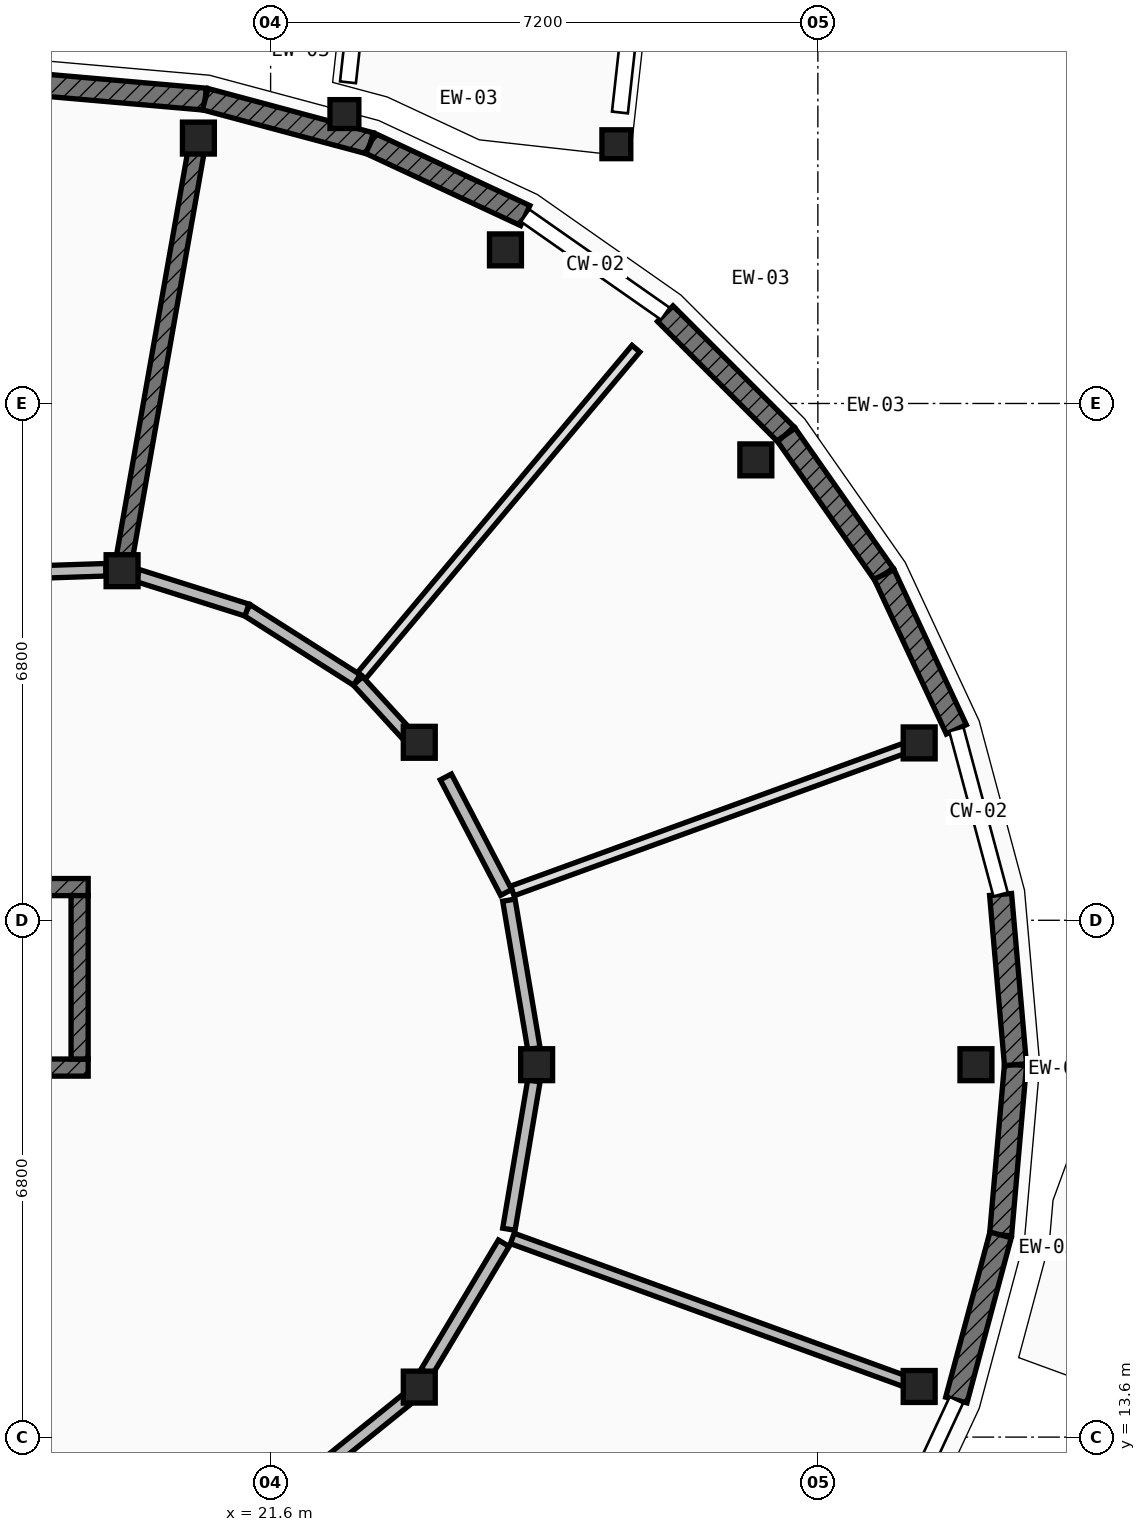
"""IFC4 building model, lengths in metres.
Left out: names, types, materials, properties, quantities, classifications, styles, units other than length and angle.
Written with IfcOpenShell. Run it as: python <this file> out.ifc"""

import sys

from ifc_helpers import new_model, si_unit, direction, frame, frame_2d, origin, origin_2d, place, context, subcontext, project, spatial, rectangle, circle, extrude, element, fill, save


model = new_model("IFC4")
c1 = context("Model", 3, precision=1e-05, world=origin(), true_north=direction((0.0, 1.0)))
c2 = subcontext(c1, "Body", "Model", "MODEL_VIEW")
j1 = project(units=[si_unit("LENGTHUNIT", "METRE"), si_unit("PLANEANGLEUNIT", "RADIAN")], contexts=[c1])
p1 = place(None, origin())
s1 = spatial("IfcSite", under=j1, at=p1, CompositionType="ELEMENT")
p2 = place(p1, origin())
s2 = spatial("IfcBuilding", under=s1, at=p2, CompositionType="ELEMENT")
p3 = place(p2, frame((0.0, 0.0, 4.55)))
s3 = spatial("IfcBuildingStorey", under=s2, at=p3, CompositionType="ELEMENT", Elevation=4.55)
for number, where, z_axis, x_axis in (
    (1, (30.88, 18.5, 0.0), (0.0, 0.0, 1.0), (1.0, 0.0, 0.0)),
    (2, (30.133, 22.734, 0.0), (0.0, 0.0, 1.0), (1.0, 0.0, 0.0)),
    (3, (27.984, 26.458, 0.0), (0.0, 0.0, 1.0), (1.0, 0.0, 0.0)),
    (4, (24.69, 29.221, 0.0), (0.0, 0.0, 1.0), (1.0, 0.0, 0.0)),
    (5, (20.65, 30.692, 0.0), (0.0, 0.0, 1.0), (1.0, 0.0, 0.0)),
    (6, (30.133, 14.266, 0.0), (0.0, 0.0, 1.0), (1.0, 0.0, 0.0)),
    (7, (25.1, 18.5, 0.0), (0.0, 0.0, 1.0), (1.0, 0.0, 0.0)),
    (8, (23.556, 22.742, 0.0), (0.0, 0.0, 1.0), (1.0, 0.0, 0.0)),
    (9, (19.646, 25.0, 0.0), (0.0, 0.0, 1.0), (1.0, 0.0, 0.0)),
    (10, (23.556, 14.258, 0.0), (0.0, 0.0, 1.0), (1.0, 0.0, 0.0)),
):
    element("IfcColumn", number, at=place(p3, frame(where, z_axis=z_axis, x_axis=x_axis)), inside=s3, PredefinedType="COLUMN", context=c2, shape_type="SweptSolid", body=[
        extrude(rectangle(XDim=0.42, YDim=0.42, at=origin_2d()), origin(), (0.0, 0.0, 1.0), 4.2),
    ])
for number, where, z_axis, x_axis in (
    (11, (22.571, 31.008, 0.0), (0.0, 0.0, 1.0), (1.0, 0.0, 0.0)),
    (12, (26.149, 30.611, 0.0), (0.0, 0.0, 1.0), (1.0, 0.0, 0.0)),
):
    element("IfcColumn", number, at=place(p3, frame(where, z_axis=z_axis, x_axis=x_axis)), inside=s3, PredefinedType="PILASTER", context=c2, shape_type="SweptSolid", body=[
        extrude(circle(Radius=0.19, at=origin_2d()), origin(), (0.0, 0.0, 1.0), 4.2),
    ])
p4 = place(p3, frame((31.4, 18.5, 0.0), z_axis=(0.0, 0.0, 1.0), x_axis=(-0.087079400775, -0.996201374201, 0.0)))
e13 = element("IfcWall", 13, at=p4, inside=s3, PredefinedType="ELEMENTEDWALL", context=c2, shape_type="SweptSolid", body=[
    extrude(rectangle(XDim=2.249, YDim=0.29, at=frame_2d((1.124, 0.0))), origin(), (0.0, 0.0, 1.0), 3.309),
])
p5 = place(p4, frame((0.574, 0.0, 0.85)))
e14 = element("IfcOpeningElement", 14, at=p5, cuts=e13, PredefinedType="OPENING", context=c2, shape_type="SweptSolid", body=[
    extrude(rectangle(XDim=1.1, YDim=1.5, at=frame_2d((0.55, 0.75))), frame((0.0, 0.155, 0.0), z_axis=(0.0, -1.0, 0.0), x_axis=(1.0, 0.0, 0.0)), (0.0, 0.0, 1.0), 0.31),
])
p6 = place(p3, frame((31.204, 16.26, 0.0), z_axis=(0.0, 0.0, 1.0), x_axis=(-0.258824721145, -0.96592430538, 0.0)))
e15 = element("IfcWall", 15, at=p6, inside=s3, PredefinedType="ELEMENTEDWALL", context=c2, shape_type="SweptSolid", body=[
    extrude(rectangle(XDim=2.249, YDim=0.29, at=frame_2d((1.125, 0.0))), origin(), (0.0, 0.0, 1.0), 3.309),
])
p7 = place(p6, frame((0.574, 0.0, 0.85)))
e16 = element("IfcOpeningElement", 16, at=p7, cuts=e15, PredefinedType="OPENING", context=c2, shape_type="SweptSolid", body=[
    extrude(rectangle(XDim=1.1, YDim=1.85, at=frame_2d((0.55, 0.925))), frame((0.0, 0.155, 0.0), z_axis=(0.0, -1.0, 0.0), x_axis=(1.0, 0.0, 0.0)), (0.0, 0.0, 1.0), 0.31),
])
p8 = place(p3, frame((18.5, 31.4, 0.0), z_axis=(0.0, 0.0, 1.0), x_axis=(0.996201374201, -0.087079400775, 0.0)))
e17 = element("IfcWall", 17, at=p8, inside=s3, PredefinedType="ELEMENTEDWALL", context=c2, shape_type="SweptSolid", body=[
    extrude(rectangle(XDim=2.249, YDim=0.29, at=frame_2d((1.124, 0.0))), origin(), (0.0, 0.0, 1.0), 3.309),
])
p9 = place(p8, frame((0.499, 0.0, 0.85)))
e18 = element("IfcOpeningElement", 18, at=p9, cuts=e17, PredefinedType="OPENING", context=c2, shape_type="SweptSolid", body=[
    extrude(rectangle(XDim=1.25, YDim=1.8, at=frame_2d((0.625, 0.9))), frame((0.0, 0.155, 0.0), z_axis=(0.0, -1.0, 0.0), x_axis=(1.0, 0.0, 0.0)), (0.0, 0.0, 1.0), 0.31),
])
p10 = place(p3, frame((20.74, 31.204, 0.0), z_axis=(0.0, 0.0, 1.0), x_axis=(0.96592430538, -0.258824721145, 0.0)))
e19 = element("IfcWall", 19, at=p10, inside=s3, PredefinedType="ELEMENTEDWALL", context=c2, shape_type="SweptSolid", body=[
    extrude(rectangle(XDim=2.249, YDim=0.29, at=frame_2d((1.125, 0.0))), origin(), (0.0, 0.0, 1.0), 3.309),
])
p11 = place(p3, frame((22.912, 30.622, 0.0), z_axis=(0.0, 0.0, 1.0), x_axis=(0.906360600886, -0.422504983593, 0.0)))
e20 = element("IfcWall", 20, at=p11, inside=s3, PredefinedType="ELEMENTEDWALL", context=c2, shape_type="SweptSolid", body=[
    extrude(rectangle(XDim=2.248, YDim=0.29, at=frame_2d((1.124, 0.0))), origin(), (0.0, 0.0, 1.0), 3.309),
])
p12 = place(p11, frame((0.499, 0.0, 0.85)))
e21 = element("IfcOpeningElement", 21, at=p12, cuts=e20, PredefinedType="OPENING", context=c2, shape_type="SweptSolid", body=[
    extrude(rectangle(XDim=1.25, YDim=2.1, at=frame_2d((0.625, 1.05))), frame((0.0, 0.155, 0.0), z_axis=(0.0, -1.0, 0.0), x_axis=(1.0, 0.0, 0.0)), (0.0, 0.0, 1.0), 0.31),
])
p13 = place(p3, frame((26.792, 28.382, 0.0), z_axis=(0.0, 0.0, 1.0), x_axis=(0.707106781187, -0.707106781187, 0.0)))
e22 = element("IfcWall", 22, at=p13, inside=s3, PredefinedType="ELEMENTEDWALL", context=c2, shape_type="SweptSolid", body=[
    extrude(rectangle(XDim=2.249, YDim=0.29, at=frame_2d((1.125, 0.0))), origin(), (0.0, 0.0, 1.0), 3.309),
])
p14 = place(p13, frame((0.484, 0.0, 0.85)))
e23 = element("IfcOpeningElement", 23, at=p14, cuts=e22, PredefinedType="OPENING", context=c2, shape_type="SweptSolid", body=[
    extrude(rectangle(XDim=1.28, YDim=1.65, at=frame_2d((0.64, 0.825))), frame((0.0, 0.155, 0.0), z_axis=(0.0, -1.0, 0.0), x_axis=(1.0, 0.0, 0.0)), (0.0, 0.0, 1.0), 0.31),
])
p15 = place(p3, frame((28.382, 26.792, 0.0), z_axis=(0.0, 0.0, 1.0), x_axis=(0.573644482107, -0.819104393925, 0.0)))
e24 = element("IfcWall", 24, at=p15, inside=s3, PredefinedType="ELEMENTEDWALL", context=c2, shape_type="SweptSolid", body=[
    extrude(rectangle(XDim=2.249, YDim=0.29, at=frame_2d((1.125, 0.0))), origin(), (0.0, 0.0, 1.0), 3.309),
])
p16 = place(p15, frame((0.474, 0.0, 0.85)))
e25 = element("IfcOpeningElement", 25, at=p16, cuts=e24, PredefinedType="OPENING", context=c2, shape_type="SweptSolid", body=[
    extrude(rectangle(XDim=1.3, YDim=1.4, at=frame_2d((0.65, 0.7))), frame((0.0, 0.155, 0.0), z_axis=(0.0, -1.0, 0.0), x_axis=(1.0, 0.0, 0.0)), (0.0, 0.0, 1.0), 0.31),
])
p17 = place(p3, frame((29.672, 24.95, 0.0), z_axis=(0.0, 0.0, 1.0), x_axis=(0.422504983593, -0.906360600886, 0.0)))
e26 = element("IfcWall", 26, at=p17, inside=s3, PredefinedType="ELEMENTEDWALL", context=c2, shape_type="SweptSolid", body=[
    extrude(rectangle(XDim=2.248, YDim=0.29, at=frame_2d((1.124, 0.0))), origin(), (0.0, 0.0, 1.0), 3.309),
])
p18 = place(p17, frame((0.474, 0.0, 0.85)))
e27 = element("IfcOpeningElement", 27, at=p18, cuts=e26, PredefinedType="OPENING", context=c2, shape_type="SweptSolid", body=[
    extrude(rectangle(XDim=1.3, YDim=1.7, at=frame_2d((0.65, 0.85))), frame((0.0, 0.155, 0.0), z_axis=(0.0, -1.0, 0.0), x_axis=(1.0, 0.0, 0.0)), (0.0, 0.0, 1.0), 0.31),
])
p19 = place(p3, frame((31.204, 20.74, 0.0), z_axis=(0.0, 0.0, 1.0), x_axis=(0.087079400775, -0.996201374201, 0.0)))
e28 = element("IfcWall", 28, at=p19, inside=s3, PredefinedType="ELEMENTEDWALL", context=c2, shape_type="SweptSolid", body=[
    extrude(rectangle(XDim=2.249, YDim=0.29, at=frame_2d((1.124, 0.0))), origin(), (0.0, 0.0, 1.0), 3.309),
])
p20 = place(p19, frame((0.474, 0.0, 0.85)))
e29 = element("IfcOpeningElement", 29, at=p20, cuts=e28, PredefinedType="OPENING", context=c2, shape_type="SweptSolid", body=[
    extrude(rectangle(XDim=1.3, YDim=2.0, at=frame_2d((0.65, 1.0))), frame((0.0, 0.155, 0.0), z_axis=(0.0, -1.0, 0.0), x_axis=(1.0, 0.0, 0.0)), (0.0, 0.0, 1.0), 0.31),
])
p21 = place(p3, frame((16.1, 18.462, 0.0), z_axis=(0.0, 0.0, 1.0), x_axis=(1.0, 0.0, 0.0)))
e30 = element("IfcWall", 30, at=p21, inside=s3, PredefinedType="SHEAR", context=c2, shape_type="SweptSolid", body=[
    extrude(rectangle(XDim=3.1, YDim=0.225, at=frame_2d((1.55, 0.0))), origin(), (0.0, 0.0, 1.0), 3.955),
])
p22 = place(p21, frame((0.9, 0.0, 0.0)))
e31 = element("IfcOpeningElement", 31, at=p22, cuts=e30, PredefinedType="OPENING", context=c2, shape_type="SweptSolid", body=[
    extrude(rectangle(XDim=1.3, YDim=2.2, at=frame_2d((0.65, 1.1))), frame((0.0, 0.123, 0.0), z_axis=(0.0, -1.0, 0.0), x_axis=(1.0, 0.0, 0.0)), (0.0, 0.0, 1.0), 0.245),
])
p23 = place(p3, frame((16.1, 20.837, 0.0), z_axis=(0.0, 0.0, 1.0), x_axis=(1.0, 0.0, 0.0)))
e32 = element("IfcWall", 32, at=p23, inside=s3, PredefinedType="SHEAR", context=c2, shape_type="SweptSolid", body=[
    extrude(rectangle(XDim=3.1, YDim=0.225, at=frame_2d((1.55, 0.0))), origin(), (0.0, 0.0, 1.0), 3.955),
])
p24 = place(p3, frame((19.087, 18.575, 0.0), z_axis=(0.0, 0.0, 1.0), x_axis=(0.0, 1.0, 0.0)))
e33 = element("IfcWall", 33, at=p24, inside=s3, PredefinedType="SHEAR", context=c2, shape_type="SweptSolid", body=[
    extrude(rectangle(XDim=2.15, YDim=0.225, at=frame_2d((1.075, 0.0))), origin(), (0.0, 0.0, 1.0), 3.955),
])
p25 = place(p3, frame((19.66, 25.081, 0.0), z_axis=(0.0, 0.0, 1.0), x_axis=(0.173787813666, 0.984783121211, 0.0)))
e34 = element("IfcWall", 34, at=p25, inside=s3, PredefinedType="SOLIDWALL", context=c2, shape_type="SweptSolid", body=[
    extrude(rectangle(XDim=5.616, YDim=0.215, at=frame_2d((2.808, 0.0))), origin(), (0.0, 0.0, 1.0), 3.284),
])
p26 = place(p3, frame((24.78, 16.214, 0.0), z_axis=(0.0, 0.0, 1.0), x_axis=(0.939718505705, -0.341949016719, 0.0)))
e35 = element("IfcWall", 35, at=p26, inside=s3, PredefinedType="PARTITIONING", context=c2, shape_type="SweptSolid", body=[
    extrude(rectangle(XDim=5.615, YDim=0.145, at=frame_2d((2.808, 0.0))), origin(), (0.0, 0.0, 1.0), 3.284),
])
p27 = place(p3, frame((24.78, 20.786, 0.0), z_axis=(0.0, 0.0, 1.0), x_axis=(0.939718505705, 0.341949016719, 0.0)))
e36 = element("IfcWall", 36, at=p27, inside=s3, PredefinedType="PLUMBINGWALL", context=c2, shape_type="SweptSolid", body=[
    extrude(rectangle(XDim=5.615, YDim=0.135, at=frame_2d((2.808, 0.0))), origin(), (0.0, 0.0, 1.0), 3.284),
])
p28 = place(p3, frame((22.796, 23.619, 0.0), z_axis=(0.0, 0.0, 1.0), x_axis=(0.642818869514, 0.766018211923, 0.0)))
e37 = element("IfcWall", 37, at=p28, inside=s3, PredefinedType="PLUMBINGWALL", context=c2, shape_type="SweptSolid", body=[
    extrude(rectangle(XDim=5.616, YDim=0.135, at=frame_2d((2.808, 0.0))), origin(), (0.0, 0.0, 1.0), 3.284),
])
p29 = place(p3, frame((19.432, 25.012, 0.0), z_axis=(0.0, 0.0, 1.0), x_axis=(-0.999438163876, -0.033516512162, 0.0)))
e38 = element("IfcWall", 38, at=p29, inside=s3, PredefinedType="PARTITIONING", context=c2, shape_type="SweptSolid", body=[
    extrude(rectangle(XDim=2.418, YDim=0.165, at=frame_2d((1.209, 0.0))), origin(), (0.0, 0.0, 1.0), 3.284),
])
p30 = place(p29, frame((0.484, 0.0, 0.0)))
e39 = element("IfcOpeningElement", 39, at=p30, cuts=e38, PredefinedType="OPENING", context=c2, shape_type="SweptSolid", body=[
    extrude(rectangle(XDim=1.45, YDim=2.28, at=frame_2d((0.725, 1.14))), frame((0.0, 0.093, 0.0), z_axis=(0.0, -1.0, 0.0), x_axis=(1.0, 0.0, 0.0)), (0.0, 0.0, 1.0), 0.185),
])
p31 = place(p3, frame((21.97, 12.95, 0.0), z_axis=(0.0, 0.0, 1.0), x_axis=(0.778080714505, 0.62816431108, 0.0)))
e40 = element("IfcWall", 40, at=p31, inside=s3, PredefinedType="PARTITIONING", context=c2, shape_type="SweptSolid", body=[
    extrude(rectangle(XDim=1.842, YDim=0.165, at=frame_2d((0.921, 0.0))), origin(), (0.0, 0.0, 1.0), 3.284),
])
p32 = place(p31, frame((0.466, 0.0, 0.0)))
e41 = element("IfcOpeningElement", 41, at=p32, cuts=e40, PredefinedType="OPENING", context=c2, shape_type="SweptSolid", body=[
    extrude(rectangle(XDim=0.91, YDim=2.15, at=frame_2d((0.455, 1.075))), frame((0.0, 0.093, 0.0), z_axis=(0.0, -1.0, 0.0), x_axis=(1.0, 0.0, 0.0)), (0.0, 0.0, 1.0), 0.185),
])
p33 = place(p3, frame((23.65, 14.451, 0.0), z_axis=(0.0, 0.0, 1.0), x_axis=(0.513788930693, 0.85791662456, 0.0)))
e42 = element("IfcWall", 42, at=p33, inside=s3, PredefinedType="PARTITIONING", context=c2, shape_type="SweptSolid", body=[
    extrude(rectangle(XDim=1.981, YDim=0.165, at=frame_2d((0.991, 0.0))), origin(), (0.0, 0.0, 1.0), 3.284),
])
p34 = place(p3, frame((24.735, 16.335, 0.0), z_axis=(0.0, 0.0, 1.0), x_axis=(0.166037850653, 0.986119380273, 0.0)))
e43 = element("IfcWall", 43, at=p34, inside=s3, PredefinedType="PARTITIONING", context=c2, shape_type="SweptSolid", body=[
    extrude(rectangle(XDim=1.981, YDim=0.165, at=frame_2d((0.99, 0.0))), origin(), (0.0, 0.0, 1.0), 3.284),
])
p35 = place(p34, frame((0.525, 0.0, 0.0)))
e44 = element("IfcOpeningElement", 44, at=p35, cuts=e43, PredefinedType="OPENING", context=c2, shape_type="SweptSolid", body=[
    extrude(rectangle(XDim=0.93, YDim=2.18, at=frame_2d((0.465, 1.09))), frame((0.0, 0.093, 0.0), z_axis=(0.0, -1.0, 0.0), x_axis=(1.0, 0.0, 0.0)), (0.0, 0.0, 1.0), 0.185),
])
p36 = place(p3, frame((25.064, 18.712, 0.0), z_axis=(0.0, 0.0, 1.0), x_axis=(-0.166037850653, 0.986119380273, 0.0)))
e45 = element("IfcWall", 45, at=p36, inside=s3, PredefinedType="PARTITIONING", context=c2, shape_type="SweptSolid", body=[
    extrude(rectangle(XDim=1.981, YDim=0.165, at=frame_2d((0.99, 0.0))), origin(), (0.0, 0.0, 1.0), 3.284),
])
p37 = place(p3, frame((24.699, 20.766, 0.0), z_axis=(0.0, 0.0, 1.0), x_axis=(-0.462585475812, 0.886574688093, 0.0)))
e46 = element("IfcWall", 46, at=p37, inside=s3, PredefinedType="PARTITIONING", context=c2, shape_type="SweptSolid", body=[
    extrude(rectangle(XDim=1.714, YDim=0.165, at=frame_2d((0.857, 0.0))), origin(), (0.0, 0.0, 1.0), 3.284),
])
p38 = place(p37, frame((0.387, 0.0, 0.0)))
e47 = element("IfcOpeningElement", 47, at=p38, cuts=e46, PredefinedType="OPENING", context=c2, shape_type="SweptSolid", body=[
    extrude(rectangle(XDim=0.94, YDim=2.1, at=frame_2d((0.47, 1.05))), frame((0.0, 0.093, 0.0), z_axis=(0.0, -1.0, 0.0), x_axis=(1.0, 0.0, 0.0)), (0.0, 0.0, 1.0), 0.185),
])
p39 = place(p3, frame((23.378, 22.863, 0.0), z_axis=(0.0, 0.0, 1.0), x_axis=(-0.675225947862, 0.737610953914, 0.0)))
e48 = element("IfcWall", 48, at=p39, inside=s3, PredefinedType="PARTITIONING", context=c2, shape_type="SweptSolid", body=[
    extrude(rectangle(XDim=0.931, YDim=0.165, at=frame_2d((0.466, 0.0))), origin(), (0.0, 0.0, 1.0), 3.284),
])
p40 = place(p3, frame((22.735, 23.562, 0.0), z_axis=(0.0, 0.0, 1.0), x_axis=(-0.843737732446, 0.536755660283, 0.0)))
e49 = element("IfcWall", 49, at=p40, inside=s3, PredefinedType="PARTITIONING", context=c2, shape_type="SweptSolid", body=[
    extrude(rectangle(XDim=1.714, YDim=0.165, at=frame_2d((0.857, 0.0))), origin(), (0.0, 0.0, 1.0), 3.284),
])
p41 = place(p40, frame((0.367, 0.0, 0.0)))
e50 = element("IfcOpeningElement", 50, at=p41, cuts=e49, PredefinedType="OPENING", context=c2, shape_type="SweptSolid", body=[
    extrude(rectangle(XDim=0.98, YDim=2.1, at=frame_2d((0.49, 1.05))), frame((0.0, 0.093, 0.0), z_axis=(0.0, -1.0, 0.0), x_axis=(1.0, 0.0, 0.0)), (0.0, 0.0, 1.0), 0.185),
])
p42 = place(p3, frame((21.289, 24.482, 0.0), z_axis=(0.0, 0.0, 1.0), x_axis=(-0.953582665134, 0.301131367937, 0.0)))
e51 = element("IfcWall", 51, at=p42, inside=s3, PredefinedType="PARTITIONING", context=c2, shape_type="SweptSolid", body=[
    extrude(rectangle(XDim=1.508, YDim=0.165, at=frame_2d((0.754, 0.0))), origin(), (0.0, 0.0, 1.0), 3.284),
])
p43 = place(p5, origin())
e52 = element("IfcWindow", 52, at=p43, inside=s3, PartitioningType="SINGLE_PANEL", PredefinedType="WINDOW", context=c2, shape_type="SweptSolid", body=[
    extrude(rectangle(XDim=1.1, YDim=1.5, at=frame_2d((0.55, 0.75))), frame((0.0, 0.03, 0.0), z_axis=(0.0, -1.0, 0.0), x_axis=(1.0, 0.0, 0.0)), (0.0, 0.0, 1.0), 0.06),
])
fill(e14, e52)
p44 = place(p7, origin())
e53 = element("IfcWindow", 53, at=p44, inside=s3, PartitioningType="SINGLE_PANEL", PredefinedType="WINDOW", context=c2, shape_type="SweptSolid", body=[
    extrude(rectangle(XDim=1.1, YDim=1.85, at=frame_2d((0.55, 0.925))), frame((0.0, 0.03, 0.0), z_axis=(0.0, -1.0, 0.0), x_axis=(1.0, 0.0, 0.0)), (0.0, 0.0, 1.0), 0.06),
])
fill(e16, e53)
p45 = place(p9, origin())
e54 = element("IfcWindow", 54, at=p45, inside=s3, PartitioningType="SINGLE_PANEL", PredefinedType="WINDOW", context=c2, shape_type="SweptSolid", body=[
    extrude(rectangle(XDim=1.25, YDim=1.8, at=frame_2d((0.625, 0.9))), frame((0.0, 0.03, 0.0), z_axis=(0.0, -1.0, 0.0), x_axis=(1.0, 0.0, 0.0)), (0.0, 0.0, 1.0), 0.06),
])
fill(e18, e54)
p46 = place(p12, origin())
e55 = element("IfcWindow", 55, at=p46, inside=s3, PartitioningType="SINGLE_PANEL", PredefinedType="WINDOW", context=c2, shape_type="SweptSolid", body=[
    extrude(rectangle(XDim=1.25, YDim=2.1, at=frame_2d((0.625, 1.05))), frame((0.0, 0.03, 0.0), z_axis=(0.0, -1.0, 0.0), x_axis=(1.0, 0.0, 0.0)), (0.0, 0.0, 1.0), 0.06),
])
fill(e21, e55)
p47 = place(p14, origin())
e56 = element("IfcWindow", 56, at=p47, inside=s3, PartitioningType="SINGLE_PANEL", PredefinedType="WINDOW", context=c2, shape_type="SweptSolid", body=[
    extrude(rectangle(XDim=1.28, YDim=1.65, at=frame_2d((0.64, 0.825))), frame((0.0, 0.03, 0.0), z_axis=(0.0, -1.0, 0.0), x_axis=(1.0, 0.0, 0.0)), (0.0, 0.0, 1.0), 0.06),
])
fill(e23, e56)
p48 = place(p16, origin())
e57 = element("IfcWindow", 57, at=p48, inside=s3, PartitioningType="SINGLE_PANEL", PredefinedType="WINDOW", context=c2, shape_type="SweptSolid", body=[
    extrude(rectangle(XDim=1.3, YDim=1.4, at=frame_2d((0.65, 0.7))), frame((0.0, 0.03, 0.0), z_axis=(0.0, -1.0, 0.0), x_axis=(1.0, 0.0, 0.0)), (0.0, 0.0, 1.0), 0.06),
])
fill(e25, e57)
p49 = place(p18, origin())
e58 = element("IfcWindow", 58, at=p49, inside=s3, PartitioningType="SINGLE_PANEL", PredefinedType="WINDOW", context=c2, shape_type="SweptSolid", body=[
    extrude(rectangle(XDim=1.3, YDim=1.7, at=frame_2d((0.65, 0.85))), frame((0.0, 0.03, 0.0), z_axis=(0.0, -1.0, 0.0), x_axis=(1.0, 0.0, 0.0)), (0.0, 0.0, 1.0), 0.06),
])
fill(e27, e58)
p50 = place(p20, origin())
e59 = element("IfcWindow", 59, at=p50, inside=s3, PartitioningType="SINGLE_PANEL", PredefinedType="WINDOW", context=c2, shape_type="SweptSolid", body=[
    extrude(rectangle(XDim=1.3, YDim=2.0, at=frame_2d((0.65, 1.0))), frame((0.0, 0.03, 0.0), z_axis=(0.0, -1.0, 0.0), x_axis=(1.0, 0.0, 0.0)), (0.0, 0.0, 1.0), 0.06),
])
fill(e29, e59)
p51 = place(p30, origin())
e60 = element("IfcDoor", 60, at=p51, inside=s3, OperationType="SINGLE_SWING_LEFT", PredefinedType="DOOR", context=c2, shape_type="SweptSolid", body=[
    extrude(rectangle(XDim=1.45, YDim=2.28, at=frame_2d((0.725, 1.14))), frame((0.0, 0.025, 0.0), z_axis=(0.0, -1.0, 0.0), x_axis=(1.0, 0.0, 0.0)), (0.0, 0.0, 1.0), 0.05),
])
fill(e39, e60)
p52 = place(p32, origin())
e61 = element("IfcDoor", 61, at=p52, inside=s3, OperationType="SINGLE_SWING_RIGHT", PredefinedType="DOOR", context=c2, shape_type="SweptSolid", body=[
    extrude(rectangle(XDim=0.91, YDim=2.15, at=frame_2d((0.455, 1.075))), frame((0.0, 0.025, 0.0), z_axis=(0.0, -1.0, 0.0), x_axis=(1.0, 0.0, 0.0)), (0.0, 0.0, 1.0), 0.05),
])
fill(e41, e61)
p53 = place(p35, origin())
e62 = element("IfcDoor", 62, at=p53, inside=s3, OperationType="SINGLE_SWING_LEFT", PredefinedType="DOOR", context=c2, shape_type="SweptSolid", body=[
    extrude(rectangle(XDim=0.93, YDim=2.18, at=frame_2d((0.465, 1.09))), frame((0.0, 0.025, 0.0), z_axis=(0.0, -1.0, 0.0), x_axis=(1.0, 0.0, 0.0)), (0.0, 0.0, 1.0), 0.05),
])
fill(e44, e62)
p54 = place(p38, origin())
e63 = element("IfcDoor", 63, at=p54, inside=s3, OperationType="SINGLE_SWING_RIGHT", PredefinedType="DOOR", context=c2, shape_type="SweptSolid", body=[
    extrude(rectangle(XDim=0.94, YDim=2.1, at=frame_2d((0.47, 1.05))), frame((0.0, 0.025, 0.0), z_axis=(0.0, -1.0, 0.0), x_axis=(1.0, 0.0, 0.0)), (0.0, 0.0, 1.0), 0.05),
])
fill(e47, e63)
p55 = place(p41, origin())
e64 = element("IfcDoor", 64, at=p55, inside=s3, OperationType="SINGLE_SWING_LEFT", PredefinedType="DOOR", context=c2, shape_type="SweptSolid", body=[
    extrude(rectangle(XDim=0.98, YDim=2.1, at=frame_2d((0.49, 1.05))), frame((0.0, 0.025, 0.0), z_axis=(0.0, -1.0, 0.0), x_axis=(1.0, 0.0, 0.0)), (0.0, 0.0, 1.0), 0.05),
])
fill(e50, e64)
save(model, sys.argv[1])
